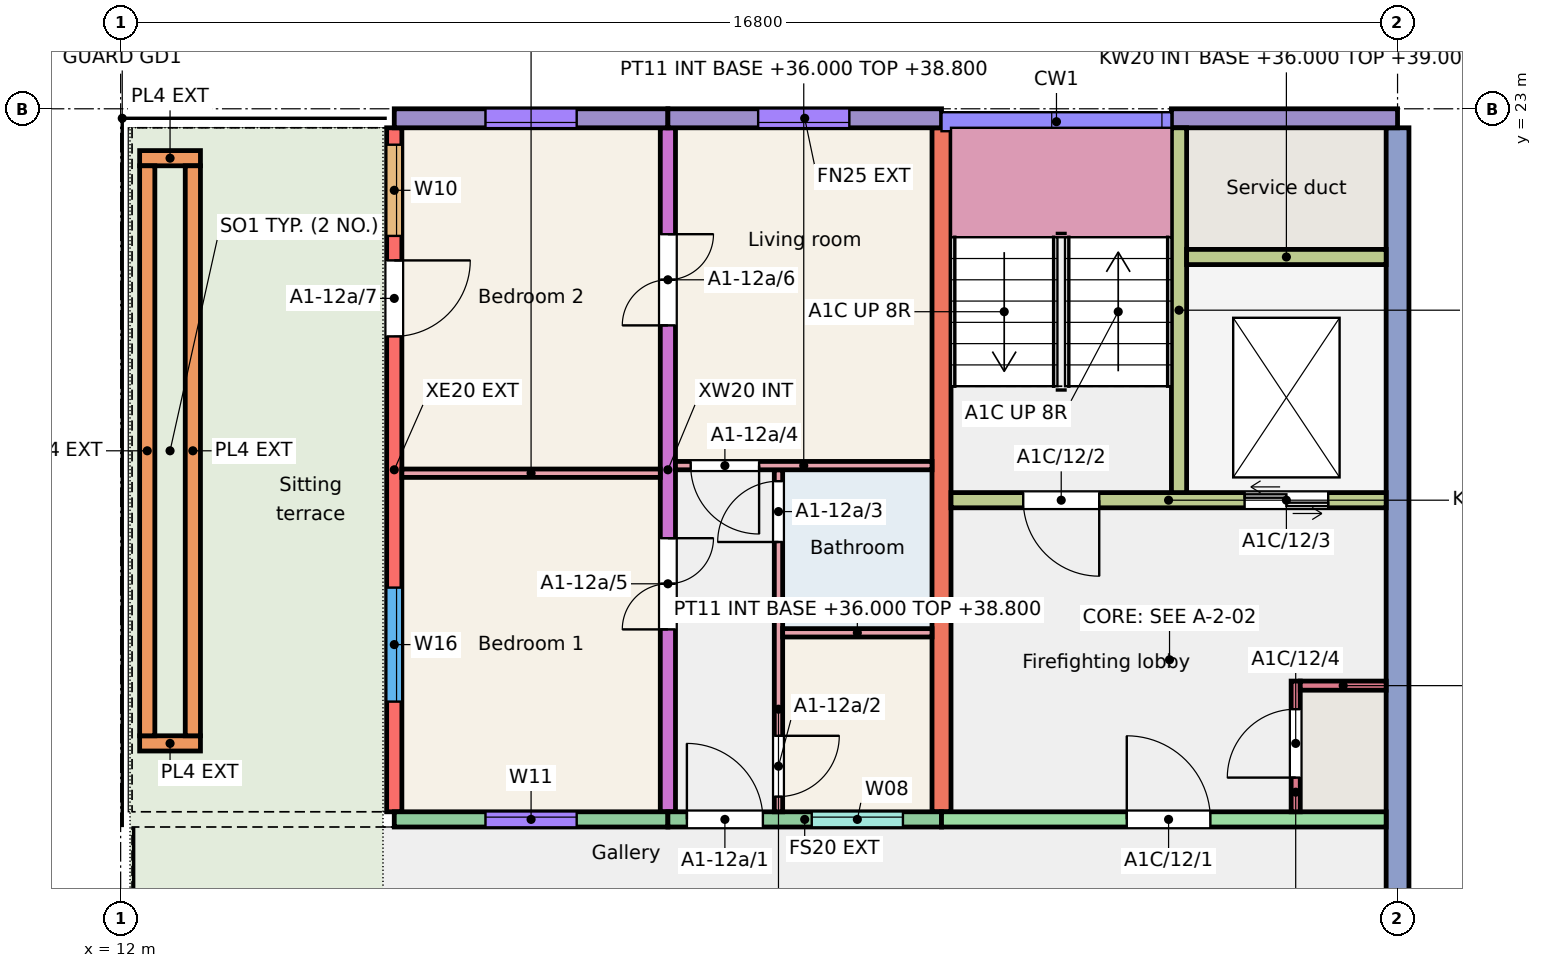
"""IFC4 building model, lengths in metres.
Left out: names, types, materials, properties, quantities, classifications, styles, units other than length and angle.
Written with IfcOpenShell. Run it as: python <this file> out.ifc"""

import sys

from ifc_helpers import new_model, si_unit, direction, frame, frame_2d, origin, place, context, subcontext, project, spatial, rectangle, extrude, element, fill, save


model = new_model("IFC4")
c1 = context("Model", 3, precision=1e-05, world=origin(), true_north=direction((0.0, 1.0)))
c2 = subcontext(c1, "Body", "Model", "MODEL_VIEW")
j1 = project(units=[si_unit("LENGTHUNIT", "METRE"), si_unit("PLANEANGLEUNIT", "RADIAN")], contexts=[c1])
p1 = place(None, origin())
s1 = spatial("IfcSite", under=j1, at=p1, CompositionType="ELEMENT")
p2 = place(p1, origin())
s2 = spatial("IfcBuilding", under=s1, at=p2, CompositionType="ELEMENT")
p3 = place(p2, frame((0.0, 0.0, 36.0)))
s3 = spatial("IfcBuildingStorey", under=s2, at=p3, CompositionType="ELEMENT", Elevation=36.0)
p4 = place(p3, frame((15.6, 13.75, 0.0), z_axis=(0.0, 0.0, 1.0), x_axis=(0.0, 1.0, 0.0)))
e1 = element("IfcWall", 1, at=p4, inside=s3, PredefinedType="SHEAR", context=c2, shape_type="SweptSolid", body=[
    extrude(rectangle(XDim=9.0, YDim=0.2, at=frame_2d((4.5, 0.0))), origin(), (0.0, 0.0, 1.0), 3.0),
])
p5 = place(p4, frame((1.45, 0.0, 0.9)))
e2 = element("IfcOpeningElement", 2, at=p5, cuts=e1, PredefinedType="OPENING", context=c2, shape_type="SweptSolid", body=[
    extrude(rectangle(XDim=1.5, YDim=1.5, at=frame_2d((0.75, 0.75))), frame((0.0, 0.11, 0.0), z_axis=(0.0, -1.0, 0.0), x_axis=(1.0, 0.0, 0.0)), (0.0, 0.0, 1.0), 0.22),
])
p6 = place(p4, frame((7.577, 0.0, 0.9)))
e3 = element("IfcOpeningElement", 3, at=p6, cuts=e1, PredefinedType="OPENING", context=c2, shape_type="SweptSolid", body=[
    extrude(rectangle(XDim=1.2, YDim=1.5, at=frame_2d((0.6, 0.75))), frame((0.0, 0.11, 0.0), z_axis=(0.0, -1.0, 0.0), x_axis=(1.0, 0.0, 0.0)), (0.0, 0.0, 1.0), 0.22),
])
p7 = place(p4, frame((6.255, 0.0, 0.0)))
e4 = element("IfcOpeningElement", 4, at=p7, cuts=e1, PredefinedType="OPENING", context=c2, shape_type="SweptSolid", body=[
    extrude(rectangle(XDim=1.0, YDim=2.1, at=frame_2d((0.5, 1.05))), frame((0.0, 0.11, 0.0), z_axis=(0.0, -1.0, 0.0), x_axis=(1.0, 0.0, 0.0)), (0.0, 0.0, 1.0), 0.22),
])
p8 = place(p3, frame((19.2, 13.75, 0.0), z_axis=(0.0, 0.0, 1.0), x_axis=(0.0, 1.0, 0.0)))
e5 = element("IfcWall", 5, at=p8, inside=s3, PredefinedType="SHEAR", context=c2, shape_type="SweptSolid", body=[
    extrude(rectangle(XDim=9.0, YDim=0.2, at=frame_2d((4.5, 0.0))), origin(), (0.0, 0.0, 1.0), 3.0),
])
p9 = place(p8, frame((2.4, 0.0, 0.0)))
e6 = element("IfcOpeningElement", 6, at=p9, cuts=e5, PredefinedType="OPENING", context=c2, shape_type="SweptSolid", body=[
    extrude(rectangle(XDim=1.2, YDim=2.1, at=frame_2d((0.6, 1.05))), frame((0.0, 0.11, 0.0), z_axis=(0.0, -1.0, 0.0), x_axis=(1.0, 0.0, 0.0)), (0.0, 0.0, 1.0), 0.22),
])
p10 = place(p8, frame((6.4, 0.0, 0.0)))
e7 = element("IfcOpeningElement", 7, at=p10, cuts=e5, PredefinedType="OPENING", context=c2, shape_type="SweptSolid", body=[
    extrude(rectangle(XDim=1.2, YDim=2.1, at=frame_2d((0.6, 1.05))), frame((0.0, 0.11, 0.0), z_axis=(0.0, -1.0, 0.0), x_axis=(1.0, 0.0, 0.0)), (0.0, 0.0, 1.0), 0.22),
])
p11 = place(p3, frame((22.8, 13.75, 0.0), z_axis=(0.0, 0.0, 1.0), x_axis=(0.0, 1.0, 0.0)))
e8 = element("IfcWall", 8, at=p11, inside=s3, PredefinedType="SHEAR", context=c2, shape_type="SweptSolid", body=[
    extrude(rectangle(XDim=9.0, YDim=0.25, at=frame_2d((4.5, 0.0))), origin(), (0.0, 0.0, 1.0), 3.0),
])
p12 = place(p3, frame((28.8, 11.75, 0.0), z_axis=(0.0, 0.0, 1.0), x_axis=(0.0, 1.0, 0.0)))
e9 = element("IfcWall", 9, at=p12, inside=s3, PredefinedType="SHEAR", context=c2, shape_type="SweptSolid", body=[
    extrude(rectangle(XDim=11.0, YDim=0.3, at=frame_2d((5.5, 0.0))), origin(), (0.0, 0.0, 1.0), 3.0),
])
p13 = place(p3, frame((15.6, 22.875, 0.0), z_axis=(0.0, 0.0, 1.0), x_axis=(1.0, 0.0, 0.0)))
e10 = element("IfcWall", 10, at=p13, inside=s3, PredefinedType="SOLIDWALL", context=c2, shape_type="SweptSolid", body=[
    extrude(rectangle(XDim=3.6, YDim=0.25, at=frame_2d((1.8, 0.0))), origin(), (0.0, 0.0, 1.0), 3.0),
])
p14 = place(p13, frame((1.2, 0.0, 0.8)))
e11 = element("IfcOpeningElement", 11, at=p14, cuts=e10, PredefinedType="OPENING", context=c2, shape_type="SweptSolid", body=[
    extrude(rectangle(XDim=1.2, YDim=1.6, at=frame_2d((0.6, 0.8))), frame((0.0, 0.135, 0.0), z_axis=(0.0, -1.0, 0.0), x_axis=(1.0, 0.0, 0.0)), (0.0, 0.0, 1.0), 0.27),
])
p15 = place(p3, frame((15.6, 13.65, 0.0), z_axis=(0.0, 0.0, 1.0), x_axis=(1.0, 0.0, 0.0)))
e12 = element("IfcWall", 12, at=p15, inside=s3, PredefinedType="SOLIDWALL", context=c2, shape_type="SweptSolid", body=[
    extrude(rectangle(XDim=3.6, YDim=0.2, at=frame_2d((1.8, 0.0))), origin(), (0.0, 0.0, 1.0), 3.0),
])
p16 = place(p15, frame((1.2, 0.0, 0.8)))
e13 = element("IfcOpeningElement", 13, at=p16, cuts=e12, PredefinedType="OPENING", context=c2, shape_type="SweptSolid", body=[
    extrude(rectangle(XDim=1.2, YDim=1.6, at=frame_2d((0.6, 0.8))), frame((0.0, 0.11, 0.0), z_axis=(0.0, -1.0, 0.0), x_axis=(1.0, 0.0, 0.0)), (0.0, 0.0, 1.0), 0.22),
])
p17 = place(p3, frame((19.2, 22.875, 0.0), z_axis=(0.0, 0.0, 1.0), x_axis=(1.0, 0.0, 0.0)))
e14 = element("IfcWall", 14, at=p17, inside=s3, PredefinedType="SOLIDWALL", context=c2, shape_type="SweptSolid", body=[
    extrude(rectangle(XDim=3.6, YDim=0.25, at=frame_2d((1.8, 0.0))), origin(), (0.0, 0.0, 1.0), 3.0),
])
p18 = place(p17, frame((1.188, 0.0, 0.8)))
e15 = element("IfcOpeningElement", 15, at=p18, cuts=e14, PredefinedType="OPENING", context=c2, shape_type="SweptSolid", body=[
    extrude(rectangle(XDim=1.2, YDim=1.6, at=frame_2d((0.6, 0.8))), frame((0.0, 0.135, 0.0), z_axis=(0.0, -1.0, 0.0), x_axis=(1.0, 0.0, 0.0)), (0.0, 0.0, 1.0), 0.27),
])
p19 = place(p3, frame((19.2, 13.65, 0.0), z_axis=(0.0, 0.0, 1.0), x_axis=(1.0, 0.0, 0.0)))
e16 = element("IfcWall", 16, at=p19, inside=s3, PredefinedType="SOLIDWALL", context=c2, shape_type="SweptSolid", body=[
    extrude(rectangle(XDim=3.6, YDim=0.2, at=frame_2d((1.8, 0.0))), origin(), (0.0, 0.0, 1.0), 3.0),
])
p20 = place(p19, frame((1.893, 0.0, 1.1)))
e17 = element("IfcOpeningElement", 17, at=p20, cuts=e16, PredefinedType="OPENING", context=c2, shape_type="SweptSolid", body=[
    extrude(rectangle(XDim=1.2, YDim=1.3, at=frame_2d((0.6, 0.65))), frame((0.0, 0.11, 0.0), z_axis=(0.0, -1.0, 0.0), x_axis=(1.0, 0.0, 0.0)), (0.0, 0.0, 1.0), 0.22),
])
p21 = place(p19, frame((0.25, 0.0, 0.0)))
e18 = element("IfcOpeningElement", 18, at=p21, cuts=e16, PredefinedType="OPENING", context=c2, shape_type="SweptSolid", body=[
    extrude(rectangle(XDim=1.0, YDim=2.1, at=frame_2d((0.5, 1.05))), frame((0.0, 0.11, 0.0), z_axis=(0.0, -1.0, 0.0), x_axis=(1.0, 0.0, 0.0)), (0.0, 0.0, 1.0), 0.22),
])
p22 = place(p3, frame((25.825, 22.875, 0.0), z_axis=(0.0, 0.0, 1.0), x_axis=(1.0, 0.0, 0.0)))
e19 = element("IfcWall", 19, at=p22, inside=s3, PredefinedType="SOLIDWALL", context=c2, shape_type="SweptSolid", body=[
    extrude(rectangle(XDim=2.975, YDim=0.25, at=frame_2d((1.488, 0.0))), origin(), (0.0, 0.0, 1.0), 3.0),
])
p23 = place(p3, frame((22.8, 13.65, 0.0), z_axis=(0.0, 0.0, 1.0), x_axis=(1.0, 0.0, 0.0)))
e20 = element("IfcWall", 20, at=p23, inside=s3, PredefinedType="SHEAR", context=c2, shape_type="SweptSolid", body=[
    extrude(rectangle(XDim=5.85, YDim=0.2, at=frame_2d((2.925, 0.0))), origin(), (0.0, 0.0, 1.0), 3.0),
])
p24 = place(p23, frame((2.438, 0.0, 0.0)))
e21 = element("IfcOpeningElement", 21, at=p24, cuts=e20, PredefinedType="OPENING", context=c2, shape_type="SweptSolid", body=[
    extrude(rectangle(XDim=1.1, YDim=2.1, at=frame_2d((0.55, 1.05))), frame((0.0, 0.11, 0.0), z_axis=(0.0, -1.0, 0.0), x_axis=(1.0, 0.0, 0.0)), (0.0, 0.0, 1.0), 0.22),
])
p25 = place(p3, frame((22.925, 17.85, 0.0), z_axis=(0.0, 0.0, 1.0), x_axis=(1.0, 0.0, 0.0)))
e22 = element("IfcWall", 22, at=p25, inside=s3, PredefinedType="SHEAR", context=c2, shape_type="SweptSolid", body=[
    extrude(rectangle(XDim=5.725, YDim=0.2, at=frame_2d((2.862, 0.0))), origin(), (0.0, 0.0, 1.0), 3.0),
])
p26 = place(p25, frame((0.95, 0.0, 0.0)))
e23 = element("IfcOpeningElement", 23, at=p26, cuts=e22, PredefinedType="OPENING", context=c2, shape_type="SweptSolid", body=[
    extrude(rectangle(XDim=1.0, YDim=2.1, at=frame_2d((0.5, 1.05))), frame((0.0, 0.11, 0.0), z_axis=(0.0, -1.0, 0.0), x_axis=(1.0, 0.0, 0.0)), (0.0, 0.0, 1.0), 0.22),
])
p27 = place(p25, frame((3.863, 0.0, 0.0)))
e24 = element("IfcOpeningElement", 24, at=p27, cuts=e22, PredefinedType="OPENING", context=c2, shape_type="SweptSolid", body=[
    extrude(rectangle(XDim=1.1, YDim=2.1, at=frame_2d((0.55, 1.05))), frame((0.0, 0.11, 0.0), z_axis=(0.0, -1.0, 0.0), x_axis=(1.0, 0.0, 0.0)), (0.0, 0.0, 1.0), 0.22),
])
p28 = place(p3, frame((25.925, 17.95, 0.0), z_axis=(0.0, 0.0, 1.0), x_axis=(0.0, 1.0, 0.0)))
e25 = element("IfcWall", 25, at=p28, inside=s3, PredefinedType="SHEAR", context=c2, shape_type="SweptSolid", body=[
    extrude(rectangle(XDim=4.8, YDim=0.2, at=frame_2d((2.4, 0.0))), origin(), (0.0, 0.0, 1.0), 3.0),
])
p29 = place(p3, frame((26.025, 21.05, 0.0), z_axis=(0.0, 0.0, 1.0), x_axis=(1.0, 0.0, 0.0)))
e26 = element("IfcWall", 26, at=p29, inside=s3, PredefinedType="SHEAR", context=c2, shape_type="SweptSolid", body=[
    extrude(rectangle(XDim=2.625, YDim=0.2, at=frame_2d((1.312, 0.0))), origin(), (0.0, 0.0, 1.0), 3.0),
])
p30 = place(p3, frame((27.46, 13.75, 0.0), z_axis=(0.0, 0.0, 1.0), x_axis=(0.0, 1.0, 0.0)))
e27 = element("IfcWall", 27, at=p30, inside=s3, PredefinedType="SHEAR", context=c2, shape_type="SweptSolid", body=[
    extrude(rectangle(XDim=1.72, YDim=0.12, at=frame_2d((0.86, 0.0))), origin(), (0.0, 0.0, 1.0), 3.0),
])
p31 = place(p30, frame((0.45, 0.0, 0.0)))
e28 = element("IfcOpeningElement", 28, at=p31, cuts=e27, PredefinedType="OPENING", context=c2, shape_type="SweptSolid", body=[
    extrude(rectangle(XDim=0.9, YDim=2.1, at=frame_2d((0.45, 1.05))), frame((0.0, 0.07, 0.0), z_axis=(0.0, -1.0, 0.0), x_axis=(1.0, 0.0, 0.0)), (0.0, 0.0, 1.0), 0.14),
])
p32 = place(p3, frame((27.52, 15.41, 0.0), z_axis=(0.0, 0.0, 1.0), x_axis=(1.0, 0.0, 0.0)))
e29 = element("IfcWall", 29, at=p32, inside=s3, PredefinedType="SHEAR", context=c2, shape_type="SweptSolid", body=[
    extrude(rectangle(XDim=1.13, YDim=0.12, at=frame_2d((0.565, 0.0))), origin(), (0.0, 0.0, 1.0), 3.0),
])
for number, where, z_axis, x_axis in (
    (30, (12.25, 14.65, 0.01), (0.0, 0.0, 1.0), (1.0, 0.0, 0.0)),
    (31, (12.25, 22.35, 0.01), (0.0, 0.0, 1.0), (1.0, 0.0, 0.0)),
):
    element("IfcWall", number, at=place(p3, frame(where, z_axis=z_axis, x_axis=x_axis)), inside=s3, PredefinedType="SOLIDWALL", context=c2, shape_type="SweptSolid", body=[
        extrude(rectangle(XDim=0.8, YDim=0.2, at=frame_2d((0.4, 0.0))), origin(), (0.0, 0.0, 1.0), 0.45),
    ])
for number, where, z_axis, x_axis in (
    (32, (12.35, 14.75, 0.01), (0.0, 0.0, 1.0), (0.0, 1.0, 0.0)),
    (33, (12.95, 14.75, 0.01), (0.0, 0.0, 1.0), (0.0, 1.0, 0.0)),
):
    element("IfcWall", number, at=place(p3, frame(where, z_axis=z_axis, x_axis=x_axis)), inside=s3, PredefinedType="SOLIDWALL", context=c2, shape_type="SweptSolid", body=[
        extrude(rectangle(XDim=7.5, YDim=0.2, at=frame_2d((3.75, 0.0))), origin(), (0.0, 0.0, 1.0), 0.45),
    ])
p33 = place(p3, frame((20.655, 13.75, 0.0), z_axis=(0.0, 0.0, 1.0), x_axis=(0.0, 1.0, 0.0)))
e34 = element("IfcWall", 34, at=p33, inside=s3, PredefinedType="PARTITIONING", context=c2, shape_type="SweptSolid", body=[
    extrude(rectangle(XDim=4.5, YDim=0.11, at=frame_2d((2.25, 0.0))), origin(), (0.0, 0.0, 1.0), 2.8),
])
p34 = place(p33, frame((0.2, 0.0, 0.0)))
e35 = element("IfcOpeningElement", 35, at=p34, cuts=e34, PredefinedType="OPENING", context=c2, shape_type="SweptSolid", body=[
    extrude(rectangle(XDim=0.8, YDim=2.1, at=frame_2d((0.4, 1.05))), frame((0.0, 0.065, 0.0), z_axis=(0.0, -1.0, 0.0), x_axis=(1.0, 0.0, 0.0)), (0.0, 0.0, 1.0), 0.13),
])
p35 = place(p33, frame((3.55, 0.0, 0.0)))
e36 = element("IfcOpeningElement", 36, at=p35, cuts=e34, PredefinedType="OPENING", context=c2, shape_type="SweptSolid", body=[
    extrude(rectangle(XDim=0.8, YDim=2.1, at=frame_2d((0.4, 1.05))), frame((0.0, 0.065, 0.0), z_axis=(0.0, -1.0, 0.0), x_axis=(1.0, 0.0, 0.0)), (0.0, 0.0, 1.0), 0.13),
])
p36 = place(p3, frame((20.71, 16.105, 0.0), z_axis=(0.0, 0.0, 1.0), x_axis=(1.0, 0.0, 0.0)))
e37 = element("IfcWall", 37, at=p36, inside=s3, PredefinedType="PARTITIONING", context=c2, shape_type="SweptSolid", body=[
    extrude(rectangle(XDim=1.965, YDim=0.11, at=frame_2d((0.982, 0.0))), origin(), (0.0, 0.0, 1.0), 2.8),
])
p37 = place(p3, frame((19.3, 18.305, 0.0), z_axis=(0.0, 0.0, 1.0), x_axis=(1.0, 0.0, 0.0)))
e38 = element("IfcWall", 38, at=p37, inside=s3, PredefinedType="PARTITIONING", context=c2, shape_type="SweptSolid", body=[
    extrude(rectangle(XDim=3.375, YDim=0.11, at=frame_2d((1.688, 0.0))), origin(), (0.0, 0.0, 1.0), 2.8),
])
p38 = place(p37, frame((0.2, 0.0, 0.0)))
e39 = element("IfcOpeningElement", 39, at=p38, cuts=e38, PredefinedType="OPENING", context=c2, shape_type="SweptSolid", body=[
    extrude(rectangle(XDim=0.9, YDim=2.1, at=frame_2d((0.45, 1.05))), frame((0.0, 0.065, 0.0), z_axis=(0.0, -1.0, 0.0), x_axis=(1.0, 0.0, 0.0)), (0.0, 0.0, 1.0), 0.13),
])
p39 = place(p3, frame((15.7, 18.205, 0.0), z_axis=(0.0, 0.0, 1.0), x_axis=(1.0, 0.0, 0.0)))
e40 = element("IfcWall", 40, at=p39, inside=s3, PredefinedType="PARTITIONING", context=c2, shape_type="SweptSolid", body=[
    extrude(rectangle(XDim=3.4, YDim=0.11, at=frame_2d((1.7, 0.0))), origin(), (0.0, 0.0, 1.0), 2.75),
])
p40 = place(p16, origin())
e41 = element("IfcWindow", 41, at=p40, inside=s3, PartitioningType="SINGLE_PANEL", PredefinedType="WINDOW", context=c2, shape_type="SweptSolid", body=[
    extrude(rectangle(XDim=1.2, YDim=1.6, at=frame_2d((0.6, 0.8))), frame((0.0, 0.06, 0.0), z_axis=(0.0, -1.0, 0.0), x_axis=(1.0, 0.0, 0.0)), (0.0, 0.0, 1.0), 0.06),
])
fill(e13, e41)
p41 = place(p14, origin())
e42 = element("IfcWindow", 42, at=p41, inside=s3, PartitioningType="SINGLE_PANEL", PredefinedType="WINDOW", context=c2, shape_type="SweptSolid", body=[
    extrude(rectangle(XDim=1.2, YDim=1.6, at=frame_2d((0.6, 0.8))), frame((0.0, -0.025, 0.0), z_axis=(0.0, -1.0, 0.0), x_axis=(1.0, 0.0, 0.0)), (0.0, 0.0, 1.0), 0.06),
])
fill(e11, e42)
p42 = place(p20, origin())
e43 = element("IfcWindow", 43, at=p42, inside=s3, PartitioningType="SINGLE_PANEL", PredefinedType="WINDOW", context=c2, shape_type="SweptSolid", body=[
    extrude(rectangle(XDim=1.2, YDim=1.3, at=frame_2d((0.6, 0.65))), frame((0.0, 0.06, 0.0), z_axis=(0.0, -1.0, 0.0), x_axis=(1.0, 0.0, 0.0)), (0.0, 0.0, 1.0), 0.06),
])
fill(e17, e43)
p43 = place(p18, origin())
e44 = element("IfcWindow", 44, at=p43, inside=s3, PartitioningType="SINGLE_PANEL", PredefinedType="WINDOW", context=c2, shape_type="SweptSolid", body=[
    extrude(rectangle(XDim=1.2, YDim=1.6, at=frame_2d((0.6, 0.8))), frame((0.0, -0.025, 0.0), z_axis=(0.0, -1.0, 0.0), x_axis=(1.0, 0.0, 0.0)), (0.0, 0.0, 1.0), 0.06),
])
fill(e15, e44)
p44 = place(p5, origin())
e45 = element("IfcWindow", 45, at=p44, inside=s3, PartitioningType="SINGLE_PANEL", PredefinedType="WINDOW", context=c2, shape_type="SweptSolid", body=[
    extrude(rectangle(XDim=1.5, YDim=1.5, at=frame_2d((0.75, 0.75))), frame((0.0, 0.0, 0.0), z_axis=(0.0, -1.0, 0.0), x_axis=(1.0, 0.0, 0.0)), (0.0, 0.0, 1.0), 0.06),
])
fill(e2, e45)
p45 = place(p6, origin())
e46 = element("IfcWindow", 46, at=p45, inside=s3, PartitioningType="SINGLE_PANEL", PredefinedType="WINDOW", context=c2, shape_type="SweptSolid", body=[
    extrude(rectangle(XDim=1.2, YDim=1.5, at=frame_2d((0.6, 0.75))), frame((0.0, 0.0, 0.0), z_axis=(0.0, -1.0, 0.0), x_axis=(1.0, 0.0, 0.0)), (0.0, 0.0, 1.0), 0.06),
])
fill(e3, e46)
p46 = place(p21, origin())
e47 = element("IfcDoor", 47, at=p46, inside=s3, OperationType="SINGLE_SWING_LEFT", PredefinedType="DOOR", context=c2, shape_type="SweptSolid", body=[
    extrude(rectangle(XDim=1.0, YDim=2.1, at=frame_2d((0.5, 1.05))), frame((0.0, 0.025, 0.0), z_axis=(0.0, -1.0, 0.0), x_axis=(1.0, 0.0, 0.0)), (0.0, 0.0, 1.0), 0.05),
])
fill(e18, e47)
p47 = place(p34, origin())
e48 = element("IfcDoor", 48, at=p47, inside=s3, OperationType="SINGLE_SWING_RIGHT", PredefinedType="DOOR", context=c2, shape_type="SweptSolid", body=[
    extrude(rectangle(XDim=0.8, YDim=2.1, at=frame_2d((0.4, 1.05))), frame((0.0, 0.025, 0.0), z_axis=(0.0, -1.0, 0.0), x_axis=(1.0, 0.0, 0.0)), (0.0, 0.0, 1.0), 0.05),
])
fill(e35, e48)
p48 = place(p35, origin())
e49 = element("IfcDoor", 49, at=p48, inside=s3, OperationType="SINGLE_SWING_LEFT", PredefinedType="DOOR", context=c2, shape_type="SweptSolid", body=[
    extrude(rectangle(XDim=0.8, YDim=2.1, at=frame_2d((0.4, 1.05))), frame((0.0, 0.025, 0.0), z_axis=(0.0, -1.0, 0.0), x_axis=(1.0, 0.0, 0.0)), (0.0, 0.0, 1.0), 0.05),
])
fill(e36, e49)
p49 = place(p38, origin())
e50 = element("IfcDoor", 50, at=p49, inside=s3, OperationType="SINGLE_SWING_RIGHT", PredefinedType="DOOR", context=c2, shape_type="SweptSolid", body=[
    extrude(rectangle(XDim=0.9, YDim=2.1, at=frame_2d((0.45, 1.05))), frame((0.0, 0.025, 0.0), z_axis=(0.0, -1.0, 0.0), x_axis=(1.0, 0.0, 0.0)), (0.0, 0.0, 1.0), 0.05),
])
fill(e39, e50)
p50 = place(p9, origin())
e51 = element("IfcDoor", 51, at=p50, inside=s3, OperationType="DOUBLE_DOOR_SINGLE_SWING", PredefinedType="DOOR", context=c2, shape_type="SweptSolid", body=[
    extrude(rectangle(XDim=1.2, YDim=2.1, at=frame_2d((0.6, 1.05))), frame((0.0, 0.025, 0.0), z_axis=(0.0, -1.0, 0.0), x_axis=(1.0, 0.0, 0.0)), (0.0, 0.0, 1.0), 0.05),
])
fill(e6, e51)
p51 = place(p10, origin())
e52 = element("IfcDoor", 52, at=p51, inside=s3, OperationType="DOUBLE_DOOR_SINGLE_SWING", PredefinedType="DOOR", context=c2, shape_type="SweptSolid", body=[
    extrude(rectangle(XDim=1.2, YDim=2.1, at=frame_2d((0.6, 1.05))), frame((0.0, 0.025, 0.0), z_axis=(0.0, -1.0, 0.0), x_axis=(1.0, 0.0, 0.0)), (0.0, 0.0, 1.0), 0.05),
])
fill(e7, e52)
p52 = place(p7, origin())
e53 = element("IfcDoor", 53, at=p52, inside=s3, OperationType="SINGLE_SWING_RIGHT", PredefinedType="DOOR", context=c2, shape_type="SweptSolid", body=[
    extrude(rectangle(XDim=1.0, YDim=2.1, at=frame_2d((0.5, 1.05))), frame((0.0, 0.025, 0.0), z_axis=(0.0, -1.0, 0.0), x_axis=(1.0, 0.0, 0.0)), (0.0, 0.0, 1.0), 0.05),
])
fill(e4, e53)
p53 = place(p24, origin())
e54 = element("IfcDoor", 54, at=p53, inside=s3, OperationType="SINGLE_SWING_LEFT", PredefinedType="DOOR", context=c2, shape_type="SweptSolid", body=[
    extrude(rectangle(XDim=1.1, YDim=2.1, at=frame_2d((0.55, 1.05))), frame((0.0, 0.025, 0.0), z_axis=(0.0, -1.0, 0.0), x_axis=(1.0, 0.0, 0.0)), (0.0, 0.0, 1.0), 0.05),
])
fill(e21, e54)
p54 = place(p26, origin())
e55 = element("IfcDoor", 55, at=p54, inside=s3, OperationType="SINGLE_SWING_RIGHT", PredefinedType="DOOR", context=c2, shape_type="SweptSolid", body=[
    extrude(rectangle(XDim=1.0, YDim=2.1, at=frame_2d((0.5, 1.05))), frame((0.0, 0.025, 0.0), z_axis=(0.0, -1.0, 0.0), x_axis=(1.0, 0.0, 0.0)), (0.0, 0.0, 1.0), 0.05),
])
fill(e23, e55)
p55 = place(p27, origin())
e56 = element("IfcDoor", 56, at=p55, inside=s3, OperationType="DOUBLE_DOOR_SLIDING", PredefinedType="DOOR", context=c2, shape_type="SweptSolid", body=[
    extrude(rectangle(XDim=1.1, YDim=2.1, at=frame_2d((0.55, 1.05))), frame((0.0, 0.025, 0.0), z_axis=(0.0, -1.0, 0.0), x_axis=(1.0, 0.0, 0.0)), (0.0, 0.0, 1.0), 0.05),
])
fill(e24, e56)
p56 = place(p31, origin())
e57 = element("IfcDoor", 57, at=p56, inside=s3, OperationType="SINGLE_SWING_LEFT", PredefinedType="DOOR", context=c2, shape_type="SweptSolid", body=[
    extrude(rectangle(XDim=0.9, YDim=2.1, at=frame_2d((0.45, 1.05))), frame((0.0, 0.025, 0.0), z_axis=(0.0, -1.0, 0.0), x_axis=(1.0, 0.0, 0.0)), (0.0, 0.0, 1.0), 0.05),
])
fill(e28, e57)
save(model, sys.argv[1])
